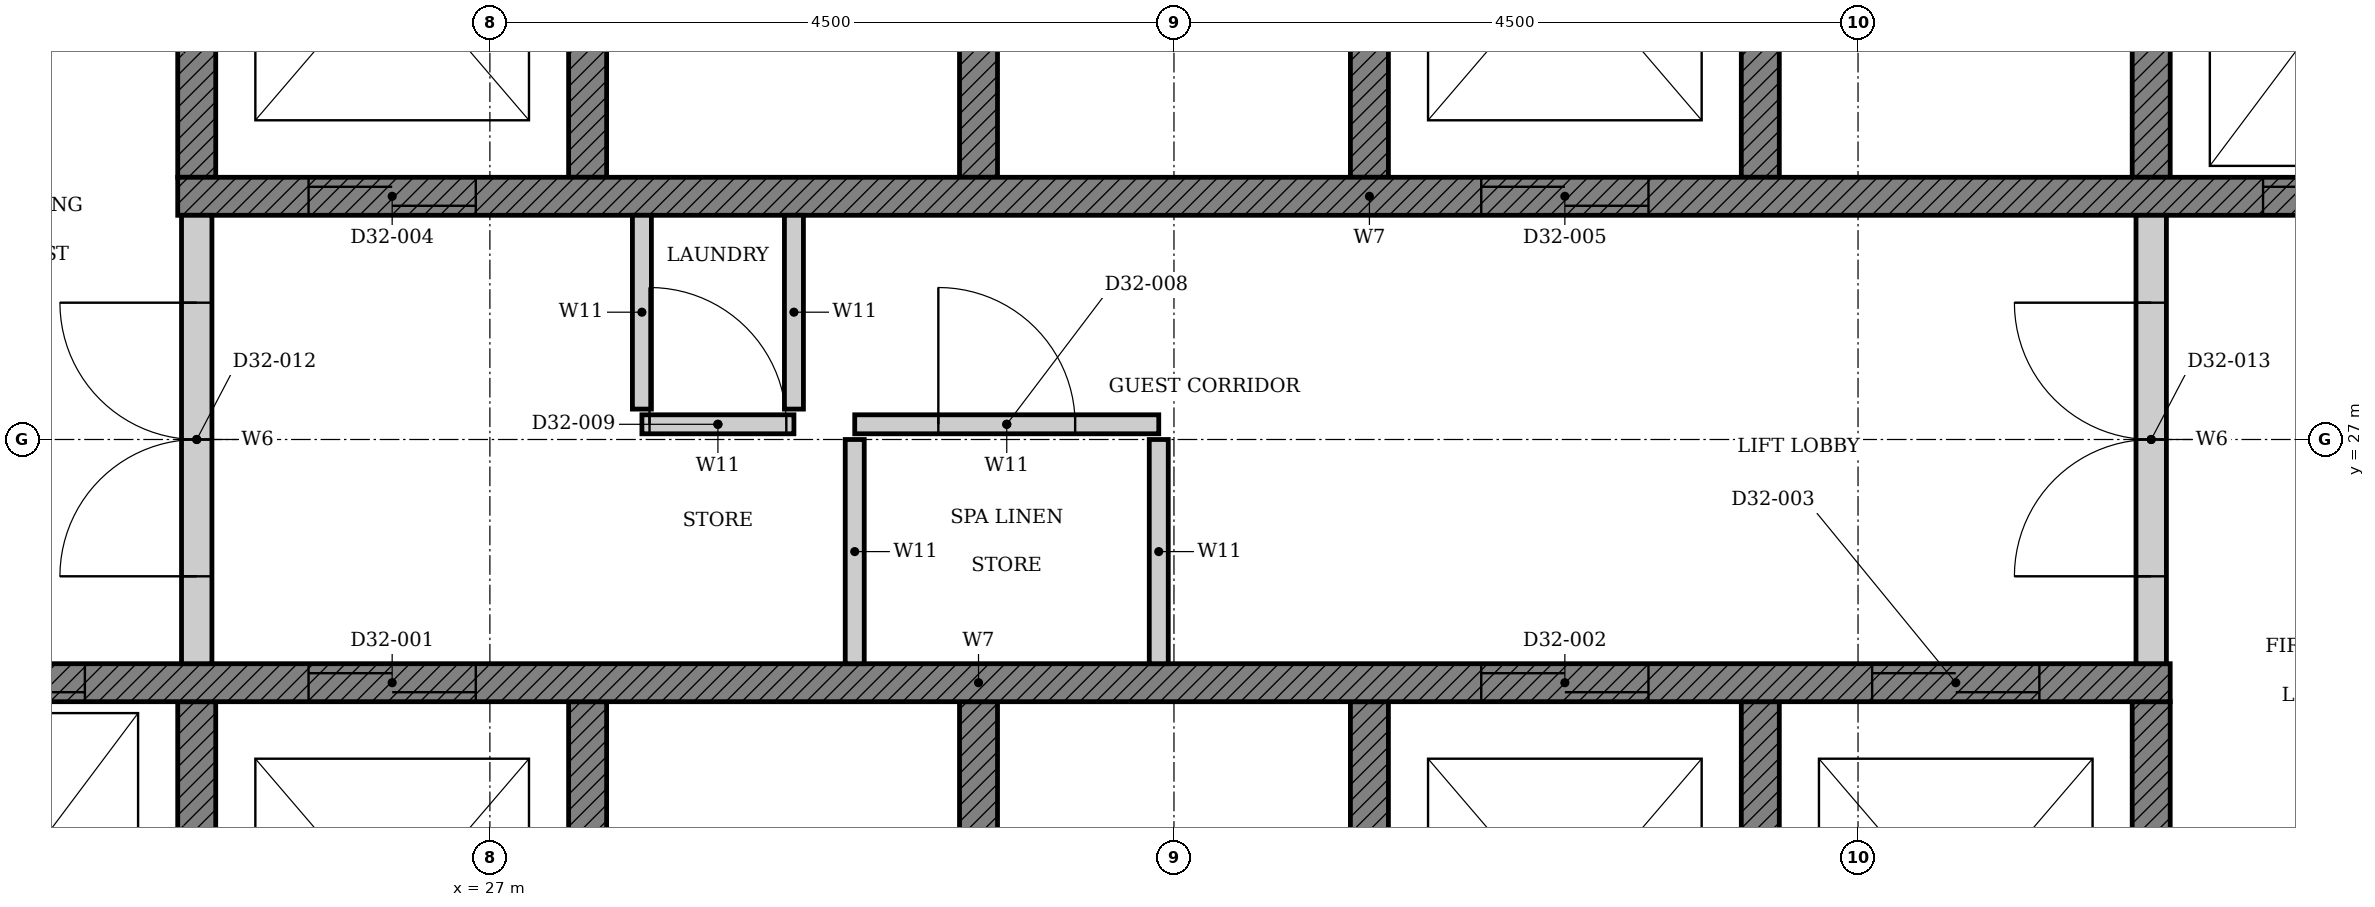
"""IFC4 building model, lengths in metres.
Left out: names, types, materials, properties, quantities, classifications, styles, units other than length and angle.
Written with IfcOpenShell. Run it as: python <this file> out.ifc"""

import sys

from ifc_helpers import new_model, si_unit, direction, frame, frame_2d, origin, place, context, subcontext, project, spatial, polyline, rectangle, outline, extrude, element, fill, save


model = new_model("IFC4")
c1 = context("Model", 3, precision=1e-05, world=origin(), true_north=direction((0.0, 1.0)))
c2 = subcontext(c1, "Body", "Model", "MODEL_VIEW")
j1 = project(units=[si_unit("LENGTHUNIT", "METRE"), si_unit("PLANEANGLEUNIT", "RADIAN")], contexts=[c1])
p1 = place(None, origin())
s1 = spatial("IfcSite", under=j1, at=p1, CompositionType="ELEMENT")
p2 = place(p1, origin())
s2 = spatial("IfcBuilding", under=s1, at=p2, CompositionType="ELEMENT")
p3 = place(p2, frame((0.0, 0.0, 129.6)))
s3 = spatial("IfcBuildingStorey", under=s2, at=p3, CompositionType="ELEMENT", Elevation=129.6)
p4 = place(p3, origin())
e1 = element("IfcWall", 1, at=p4, inside=s3, PredefinedType="SHEAR", context=c2, shape_type="SweptSolid", body=[
    extrude(outline(polyline([(22.375, 22.35), (38.053, 22.35), (38.053, 25.275), (37.803, 25.275), (37.803, 22.65), (35.482, 22.65), (35.482, 25.275), (35.232, 25.275), (35.232, 22.65), (32.911, 22.65), (32.911, 25.275), (32.661, 25.275), (32.661, 22.65), (30.339, 22.65), (30.339, 25.275), (30.089, 25.275), (30.089, 22.65), (27.768, 22.65), (27.768, 25.275), (27.518, 25.275), (27.518, 22.65), (25.197, 22.65), (25.197, 25.275), (24.947, 25.275), (24.947, 22.65), (22.625, 22.65), (22.625, 25.275), (22.375, 25.275), (22.375, 22.35)])), origin(), (0.0, 0.0, 1.0), 3.3),
])
p5 = place(p3, origin())
e2 = element("IfcWall", 2, at=p5, inside=s3, PredefinedType="SHEAR", context=c2, shape_type="SweptSolid", body=[
    extrude(outline(polyline([(24.947, 28.725), (25.197, 28.725), (25.197, 31.35), (27.518, 31.35), (27.518, 28.725), (27.768, 28.725), (27.768, 31.35), (30.089, 31.35), (30.089, 28.725), (30.339, 28.725), (30.339, 31.35), (32.661, 31.35), (32.661, 28.725), (32.911, 28.725), (32.911, 31.35), (35.232, 31.35), (35.232, 28.725), (35.482, 28.725), (35.482, 31.35), (37.803, 31.35), (37.803, 28.725), (38.053, 28.725), (38.053, 31.35), (40.375, 31.35), (40.375, 28.725), (40.625, 28.725), (40.625, 31.65), (24.947, 31.65), (24.947, 28.725)])), origin(), (0.0, 0.0, 1.0), 3.3),
])
p6 = place(p3, frame((22.375, 25.4, 0.0), z_axis=(0.0, 0.0, 1.0), x_axis=(1.0, 0.0, 0.0)))
e3 = element("IfcWall", 3, at=p6, inside=s3, PredefinedType="SHEAR", context=c2, shape_type="SweptSolid", body=[
    extrude(rectangle(XDim=15.678, YDim=0.25, at=frame_2d((7.839, 0.0))), origin(), (0.0, 0.0, 1.0), 3.3),
])
p7 = place(p6, frame((3.432, 0.0, 0.0)))
e4 = element("IfcOpeningElement", 4, at=p7, cuts=e3, PredefinedType="OPENING", context=c2, shape_type="SweptSolid", body=[
    extrude(rectangle(XDim=1.1, YDim=2.1, at=frame_2d((0.55, 1.05))), frame((0.0, 0.135, 0.0), z_axis=(0.0, -1.0, 0.0), x_axis=(1.0, 0.0, 0.0)), (0.0, 0.0, 1.0), 0.27),
])
p8 = place(p6, frame((11.146, 0.0, 0.0)))
e5 = element("IfcOpeningElement", 5, at=p8, cuts=e3, PredefinedType="OPENING", context=c2, shape_type="SweptSolid", body=[
    extrude(rectangle(XDim=1.1, YDim=2.1, at=frame_2d((0.55, 1.05))), frame((0.0, 0.135, 0.0), z_axis=(0.0, -1.0, 0.0), x_axis=(1.0, 0.0, 0.0)), (0.0, 0.0, 1.0), 0.27),
])
p9 = place(p6, frame((13.718, 0.0, 0.0)))
e6 = element("IfcOpeningElement", 6, at=p9, cuts=e3, PredefinedType="OPENING", context=c2, shape_type="SweptSolid", body=[
    extrude(rectangle(XDim=1.1, YDim=2.1, at=frame_2d((0.55, 1.05))), frame((0.0, 0.135, 0.0), z_axis=(0.0, -1.0, 0.0), x_axis=(1.0, 0.0, 0.0)), (0.0, 0.0, 1.0), 0.27),
])
p10 = place(p6, frame((0.861, 0.0, 0.0)))
e7 = element("IfcOpeningElement", 7, at=p10, cuts=e3, PredefinedType="OPENING", context=c2, shape_type="SweptSolid", body=[
    extrude(rectangle(XDim=1.1, YDim=2.1, at=frame_2d((0.55, 1.05))), frame((0.0, 0.135, 0.0), z_axis=(0.0, -1.0, 0.0), x_axis=(1.0, 0.0, 0.0)), (0.0, 0.0, 1.0), 0.27),
])
p11 = place(p3, frame((24.947, 28.6, 0.0), z_axis=(0.0, 0.0, 1.0), x_axis=(1.0, 0.0, 0.0)))
e8 = element("IfcWall", 8, at=p11, inside=s3, PredefinedType="SHEAR", context=c2, shape_type="SweptSolid", body=[
    extrude(rectangle(XDim=15.678, YDim=0.25, at=frame_2d((7.839, 0.0))), origin(), (0.0, 0.0, 1.0), 3.3),
])
p12 = place(p11, frame((0.861, 0.0, 0.0)))
e9 = element("IfcOpeningElement", 9, at=p12, cuts=e8, PredefinedType="OPENING", context=c2, shape_type="SweptSolid", body=[
    extrude(rectangle(XDim=1.1, YDim=2.1, at=frame_2d((0.55, 1.05))), frame((0.0, 0.135, 0.0), z_axis=(0.0, -1.0, 0.0), x_axis=(1.0, 0.0, 0.0)), (0.0, 0.0, 1.0), 0.27),
])
p13 = place(p11, frame((8.575, 0.0, 0.0)))
e10 = element("IfcOpeningElement", 10, at=p13, cuts=e8, PredefinedType="OPENING", context=c2, shape_type="SweptSolid", body=[
    extrude(rectangle(XDim=1.1, YDim=2.1, at=frame_2d((0.55, 1.05))), frame((0.0, 0.135, 0.0), z_axis=(0.0, -1.0, 0.0), x_axis=(1.0, 0.0, 0.0)), (0.0, 0.0, 1.0), 0.27),
])
p14 = place(p11, frame((13.718, 0.0, 0.0)))
e11 = element("IfcOpeningElement", 11, at=p14, cuts=e8, PredefinedType="OPENING", context=c2, shape_type="SweptSolid", body=[
    extrude(rectangle(XDim=1.1, YDim=2.1, at=frame_2d((0.55, 1.05))), frame((0.0, 0.135, 0.0), z_axis=(0.0, -1.0, 0.0), x_axis=(1.0, 0.0, 0.0)), (0.0, 0.0, 1.0), 0.27),
])
p15 = place(p3, frame((29.4, 27.1, 0.0), z_axis=(0.0, 0.0, 1.0), x_axis=(1.0, 0.0, 0.0)))
e12 = element("IfcWall", 12, at=p15, inside=s3, PredefinedType="PARTITIONING", context=c2, shape_type="SweptSolid", body=[
    extrude(rectangle(XDim=2.0, YDim=0.125, at=frame_2d((1.0, 0.0))), origin(), (0.0, 0.0, 1.0), 3.3),
])
p16 = place(p15, frame((0.55, 0.0, 0.0)))
e13 = element("IfcOpeningElement", 13, at=p16, cuts=e12, PredefinedType="OPENING", context=c2, shape_type="SweptSolid", body=[
    extrude(rectangle(XDim=0.9, YDim=2.1, at=frame_2d((0.45, 1.05))), frame((0.0, 0.073, 0.0), z_axis=(0.0, -1.0, 0.0), x_axis=(1.0, 0.0, 0.0)), (0.0, 0.0, 1.0), 0.145),
])
for number, where, z_axis, x_axis in (
    (14, (29.4, 25.525, 0.0), (0.0, 0.0, 1.0), (0.0, 1.0, 0.0)),
    (15, (31.4, 25.525, 0.0), (0.0, 0.0, 1.0), (0.0, 1.0, 0.0)),
):
    element("IfcWall", number, at=place(p3, frame(where, z_axis=z_axis, x_axis=x_axis)), inside=s3, PredefinedType="PARTITIONING", context=c2, shape_type="SweptSolid", body=[
        extrude(rectangle(XDim=1.475, YDim=0.125, at=frame_2d((0.738, 0.0))), origin(), (0.0, 0.0, 1.0), 3.3),
    ])
p17 = place(p3, frame((28.0, 27.1, 0.0), z_axis=(0.0, 0.0, 1.0), x_axis=(1.0, 0.0, 0.0)))
e16 = element("IfcWall", 16, at=p17, inside=s3, PredefinedType="PARTITIONING", context=c2, shape_type="SweptSolid", body=[
    extrude(rectangle(XDim=1.0, YDim=0.125, at=frame_2d((0.5, 0.0))), origin(), (0.0, 0.0, 1.0), 3.3),
])
p18 = place(p17, frame((0.05, 0.0, 0.0)))
e17 = element("IfcOpeningElement", 17, at=p18, cuts=e16, PredefinedType="OPENING", context=c2, shape_type="SweptSolid", body=[
    extrude(rectangle(XDim=0.9, YDim=2.1, at=frame_2d((0.45, 1.05))), frame((0.0, 0.073, 0.0), z_axis=(0.0, -1.0, 0.0), x_axis=(1.0, 0.0, 0.0)), (0.0, 0.0, 1.0), 0.145),
])
for number, where, z_axis, x_axis in (
    (18, (28.0, 28.475, 0.0), (0.0, 0.0, 1.0), (0.0, -1.0, 0.0)),
    (19, (29.0, 28.475, 0.0), (0.0, 0.0, 1.0), (0.0, -1.0, 0.0)),
):
    element("IfcWall", number, at=place(p3, frame(where, z_axis=z_axis, x_axis=x_axis)), inside=s3, PredefinedType="PARTITIONING", context=c2, shape_type="SweptSolid", body=[
        extrude(rectangle(XDim=1.275, YDim=0.125, at=frame_2d((0.638, 0.0))), origin(), (0.0, 0.0, 1.0), 3.3),
    ])
p19 = place(p3, frame((25.072, 25.525, 0.0), z_axis=(0.0, 0.0, 1.0), x_axis=(0.0, 1.0, 0.0)))
e20 = element("IfcWall", 20, at=p19, inside=s3, PredefinedType="PARTITIONING", context=c2, shape_type="SweptSolid", body=[
    extrude(rectangle(XDim=2.95, YDim=0.2, at=frame_2d((1.475, 0.0))), origin(), (0.0, 0.0, 1.0), 3.3),
])
p20 = place(p19, frame((0.575, 0.0, 0.0)))
e21 = element("IfcOpeningElement", 21, at=p20, cuts=e20, PredefinedType="OPENING", context=c2, shape_type="SweptSolid", body=[
    extrude(rectangle(XDim=1.8, YDim=2.1, at=frame_2d((0.9, 1.05))), frame((0.0, 0.11, 0.0), z_axis=(0.0, -1.0, 0.0), x_axis=(1.0, 0.0, 0.0)), (0.0, 0.0, 1.0), 0.22),
])
p21 = place(p3, frame((37.928, 25.525, 0.0), z_axis=(0.0, 0.0, 1.0), x_axis=(0.0, 1.0, 0.0)))
e22 = element("IfcWall", 22, at=p21, inside=s3, PredefinedType="PARTITIONING", context=c2, shape_type="SweptSolid", body=[
    extrude(rectangle(XDim=2.95, YDim=0.2, at=frame_2d((1.475, 0.0))), origin(), (0.0, 0.0, 1.0), 3.3),
])
p22 = place(p21, frame((0.575, 0.0, 0.0)))
e23 = element("IfcOpeningElement", 23, at=p22, cuts=e22, PredefinedType="OPENING", context=c2, shape_type="SweptSolid", body=[
    extrude(rectangle(XDim=1.8, YDim=2.1, at=frame_2d((0.9, 1.05))), frame((0.0, 0.11, 0.0), z_axis=(0.0, -1.0, 0.0), x_axis=(1.0, 0.0, 0.0)), (0.0, 0.0, 1.0), 0.22),
])
p23 = place(p7, origin())
e24 = element("IfcDoor", 24, at=p23, inside=s3, OperationType="DOUBLE_DOOR_SLIDING", PredefinedType="DOOR", context=c2, shape_type="SweptSolid", body=[
    extrude(rectangle(XDim=1.1, YDim=2.1, at=frame_2d((0.55, 1.05))), frame((0.0, 0.025, 0.0), z_axis=(0.0, -1.0, 0.0), x_axis=(1.0, 0.0, 0.0)), (0.0, 0.0, 1.0), 0.05),
])
fill(e4, e24)
p24 = place(p8, origin())
e25 = element("IfcDoor", 25, at=p24, inside=s3, OperationType="DOUBLE_DOOR_SLIDING", PredefinedType="DOOR", context=c2, shape_type="SweptSolid", body=[
    extrude(rectangle(XDim=1.1, YDim=2.1, at=frame_2d((0.55, 1.05))), frame((0.0, 0.025, 0.0), z_axis=(0.0, -1.0, 0.0), x_axis=(1.0, 0.0, 0.0)), (0.0, 0.0, 1.0), 0.05),
])
fill(e5, e25)
p25 = place(p9, origin())
e26 = element("IfcDoor", 26, at=p25, inside=s3, OperationType="DOUBLE_DOOR_SLIDING", PredefinedType="DOOR", context=c2, shape_type="SweptSolid", body=[
    extrude(rectangle(XDim=1.1, YDim=2.1, at=frame_2d((0.55, 1.05))), frame((0.0, 0.025, 0.0), z_axis=(0.0, -1.0, 0.0), x_axis=(1.0, 0.0, 0.0)), (0.0, 0.0, 1.0), 0.05),
])
fill(e6, e26)
p26 = place(p12, origin())
e27 = element("IfcDoor", 27, at=p26, inside=s3, OperationType="DOUBLE_DOOR_SLIDING", PredefinedType="DOOR", context=c2, shape_type="SweptSolid", body=[
    extrude(rectangle(XDim=1.1, YDim=2.1, at=frame_2d((0.55, 1.05))), frame((0.0, 0.025, 0.0), z_axis=(0.0, -1.0, 0.0), x_axis=(1.0, 0.0, 0.0)), (0.0, 0.0, 1.0), 0.05),
])
fill(e9, e27)
p27 = place(p13, origin())
e28 = element("IfcDoor", 28, at=p27, inside=s3, OperationType="DOUBLE_DOOR_SLIDING", PredefinedType="DOOR", context=c2, shape_type="SweptSolid", body=[
    extrude(rectangle(XDim=1.1, YDim=2.1, at=frame_2d((0.55, 1.05))), frame((0.0, 0.025, 0.0), z_axis=(0.0, -1.0, 0.0), x_axis=(1.0, 0.0, 0.0)), (0.0, 0.0, 1.0), 0.05),
])
fill(e10, e28)
p28 = place(p10, origin())
e29 = element("IfcDoor", 29, at=p28, inside=s3, OperationType="DOUBLE_DOOR_SLIDING", PredefinedType="DOOR", context=c2, shape_type="SweptSolid", body=[
    extrude(rectangle(XDim=1.1, YDim=2.1, at=frame_2d((0.55, 1.05))), frame((0.0, 0.025, 0.0), z_axis=(0.0, -1.0, 0.0), x_axis=(1.0, 0.0, 0.0)), (0.0, 0.0, 1.0), 0.05),
])
fill(e7, e29)
p29 = place(p14, origin())
e30 = element("IfcDoor", 30, at=p29, inside=s3, OperationType="DOUBLE_DOOR_SLIDING", PredefinedType="DOOR", context=c2, shape_type="SweptSolid", body=[
    extrude(rectangle(XDim=1.1, YDim=2.1, at=frame_2d((0.55, 1.05))), frame((0.0, 0.025, 0.0), z_axis=(0.0, -1.0, 0.0), x_axis=(1.0, 0.0, 0.0)), (0.0, 0.0, 1.0), 0.05),
])
fill(e11, e30)
p30 = place(p16, origin())
e31 = element("IfcDoor", 31, at=p30, inside=s3, OperationType="SINGLE_SWING_LEFT", PredefinedType="DOOR", context=c2, shape_type="SweptSolid", body=[
    extrude(rectangle(XDim=0.9, YDim=2.1, at=frame_2d((0.45, 1.05))), frame((0.0, 0.025, 0.0), z_axis=(0.0, -1.0, 0.0), x_axis=(1.0, 0.0, 0.0)), (0.0, 0.0, 1.0), 0.05),
])
fill(e13, e31)
p31 = place(p18, origin())
e32 = element("IfcDoor", 32, at=p31, inside=s3, OperationType="SINGLE_SWING_LEFT", PredefinedType="DOOR", context=c2, shape_type="SweptSolid", body=[
    extrude(rectangle(XDim=0.9, YDim=2.1, at=frame_2d((0.45, 1.05))), frame((0.0, 0.025, 0.0), z_axis=(0.0, -1.0, 0.0), x_axis=(1.0, 0.0, 0.0)), (0.0, 0.0, 1.0), 0.05),
])
fill(e17, e32)
p32 = place(p20, origin())
e33 = element("IfcDoor", 33, at=p32, inside=s3, OperationType="DOUBLE_DOOR_SINGLE_SWING", PredefinedType="DOOR", context=c2, shape_type="SweptSolid", body=[
    extrude(rectangle(XDim=1.8, YDim=2.1, at=frame_2d((0.9, 1.05))), frame((0.0, 0.025, 0.0), z_axis=(0.0, -1.0, 0.0), x_axis=(1.0, 0.0, 0.0)), (0.0, 0.0, 1.0), 0.05),
])
fill(e21, e33)
p33 = place(p22, origin())
e34 = element("IfcDoor", 34, at=p33, inside=s3, OperationType="DOUBLE_DOOR_SINGLE_SWING", PredefinedType="DOOR", context=c2, shape_type="SweptSolid", body=[
    extrude(rectangle(XDim=1.8, YDim=2.1, at=frame_2d((0.9, 1.05))), frame((0.0, 0.025, 0.0), z_axis=(0.0, -1.0, 0.0), x_axis=(1.0, 0.0, 0.0)), (0.0, 0.0, 1.0), 0.05),
])
fill(e23, e34)
save(model, sys.argv[1])
